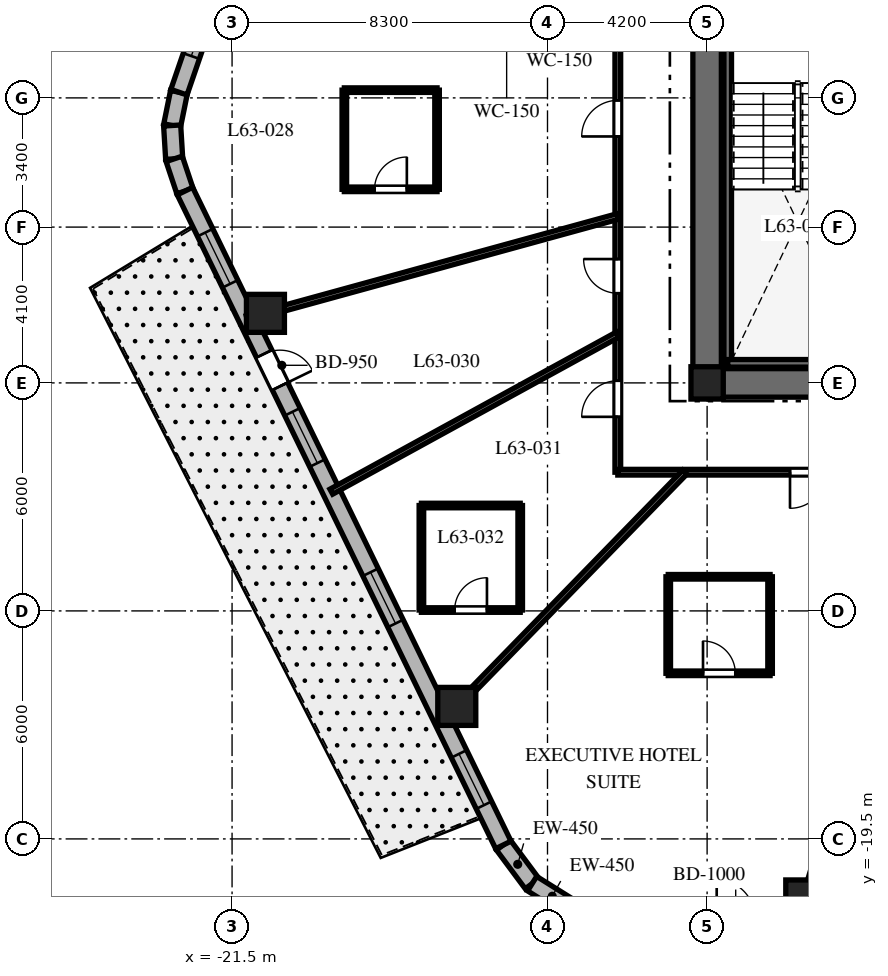
"""IFC4 building model, lengths in metres.
Left out: names, types, materials, properties, quantities, classifications, styles, units other than length and angle.
Written with IfcOpenShell. Run it as: python <this file> out.ifc"""

import sys

from ifc_helpers import new_model, si_unit, direction, frame, frame_2d, origin, origin_2d, place, context, subcontext, project, spatial, rectangle, extrude, element, fill, save


model = new_model("IFC4")
c1 = context("Model", 3, precision=1e-05, world=origin(), true_north=direction((0.0, 1.0)))
c2 = subcontext(c1, "Body", "Model", "MODEL_VIEW")
j1 = project(units=[si_unit("LENGTHUNIT", "METRE"), si_unit("PLANEANGLEUNIT", "RADIAN")], contexts=[c1])
p1 = place(None, origin())
s1 = spatial("IfcSite", under=j1, at=p1, CompositionType="ELEMENT")
p2 = place(p1, origin())
s2 = spatial("IfcBuilding", under=s1, at=p2, CompositionType="ELEMENT")
p3 = place(p2, frame((0.0, 0.0, 252.1)))
s3 = spatial("IfcBuildingStorey", under=s2, at=p3, CompositionType="ELEMENT", Elevation=252.1)
p4 = place(p3, frame((-9.375, -7.5, 0.0), z_axis=(0.0, 0.0, 1.0), x_axis=(1.0, 0.0, 0.0)))
e1 = element("IfcWall", 1, at=p4, inside=s3, PredefinedType="SHEAR", context=c2, shape_type="SweptSolid", body=[
    extrude(rectangle(XDim=18.75, YDim=0.75, at=frame_2d((9.375, 0.0))), origin(), (0.0, 0.0, 1.0), 3.8),
])
p5 = place(p4, frame((9.425, 0.0, 0.0)))
e2 = element("IfcOpeningElement", 2, at=p5, cuts=e1, PredefinedType="OPENING", context=c2, shape_type="SweptSolid", body=[
    extrude(rectangle(XDim=1.0, YDim=2.15, at=frame_2d((0.5, 1.075))), frame((0.0, 0.385, 0.0), z_axis=(0.0, -1.0, 0.0), x_axis=(1.0, 0.0, 0.0)), (0.0, 0.0, 1.0), 0.77),
])
p6 = place(p3, frame((-9.0, -7.125, 0.0), z_axis=(0.0, 0.0, 1.0), x_axis=(0.0, 1.0, 0.0)))
e3 = element("IfcWall", 3, at=p6, inside=s3, PredefinedType="SHEAR", context=c2, shape_type="SweptSolid", body=[
    extrude(rectangle(XDim=14.25, YDim=0.75, at=frame_2d((7.125, 0.0))), origin(), (0.0, 0.0, 1.0), 3.8),
])
p7 = place(p6, frame((10.25, 0.0, 0.0)))
e4 = element("IfcOpeningElement", 4, at=p7, cuts=e3, PredefinedType="OPENING", context=c2, shape_type="SweptSolid", body=[
    extrude(rectangle(XDim=1.05, YDim=2.15, at=frame_2d((0.525, 1.075))), frame((0.0, 0.385, 0.0), z_axis=(0.0, -1.0, 0.0), x_axis=(1.0, 0.0, 0.0)), (0.0, 0.0, 1.0), 0.77),
])
p8 = place(p3, frame((-8.458, -6.985, 0.0), z_axis=(0.0, 0.0, 1.0), x_axis=(0.0, 1.0, 0.0)))
e5 = element("IfcWall", 5, at=p8, inside=s3, PredefinedType="SHEAR", context=c2, shape_type="SweptSolid", body=[
    extrude(rectangle(XDim=9.143, YDim=0.2, at=frame_2d((4.572, 0.0))), origin(), (0.0, 0.0, 1.0), 3.8),
])
p9 = place(p3, frame((-8.458, -6.985, 0.0), z_axis=(0.0, 0.0, 1.0), x_axis=(1.0, 0.0, 0.0)))
e6 = element("IfcWall", 6, at=p9, inside=s3, PredefinedType="SHEAR", context=c2, shape_type="SweptSolid", body=[
    extrude(rectangle(XDim=3.686, YDim=0.2, at=frame_2d((1.843, 0.0))), origin(), (0.0, 0.0, 1.0), 3.8),
])
p10 = place(p3, frame((-9.0, -7.5, 0.0), z_axis=(0.0, 0.0, 1.0), x_axis=(1.0, 0.0, 0.0)))
e7 = element("IfcColumn", 7, at=p10, inside=s3, PredefinedType="COLUMN", context=c2, shape_type="SweptSolid", body=[
    extrude(rectangle(XDim=0.85, YDim=0.85, at=origin_2d()), origin(), (0.0, 0.0, 1.0), 3.8),
])
for number, where, z_axis, x_axis in (
    (8, (-6.43, -21.08, 0.0), (0.0, 0.0, 1.0), (1.0, 0.0, 0.0)),
    (9, (-20.622, -5.67, 0.0), (0.0, 0.0, 1.0), (1.0, 0.0, 0.0)),
    (10, (-15.587, -16.013, 0.0), (0.0, 0.0, 1.0), (1.0, 0.0, 0.0)),
):
    element("IfcColumn", number, at=place(p3, frame(where, z_axis=z_axis, x_axis=x_axis)), inside=s3, PredefinedType="COLUMN", context=c2, shape_type="SweptSolid", body=[
        extrude(rectangle(XDim=1.0, YDim=1.0, at=origin_2d()), origin(), (0.0, 0.0, 1.0), 3.8),
    ])
p11 = place(p3, frame((-14.362, -19.658, 0.0), z_axis=(0.0, 0.0, 1.0), x_axis=(0.596642462792, -0.80250717853, 0.0)))
e11 = element("IfcWall", 11, at=p11, inside=s3, PredefinedType="SOLIDWALL", context=c2, shape_type="SweptSolid", body=[
    extrude(rectangle(XDim=1.27, YDim=0.45, at=frame_2d((0.635, 0.0))), origin(), (0.0, 0.0, 1.0), 3.48),
])
p12 = place(p3, frame((-13.604, -20.678, 0.0), z_axis=(0.0, 0.0, 1.0), x_axis=(0.847910404124, -0.53013955387, 0.0)))
e12 = element("IfcWall", 12, at=p12, inside=s3, PredefinedType="SOLIDWALL", context=c2, shape_type="SweptSolid", body=[
    extrude(rectangle(XDim=1.249, YDim=0.45, at=frame_2d((0.624, 0.0))), origin(), (0.0, 0.0, 1.0), 3.48),
])
p13 = place(p3, frame((-22.898, 0.15, 0.0), z_axis=(0.0, 0.0, 1.0), x_axis=(-0.199055826889, -0.979988151858, 0.0)))
e13 = element("IfcWall", 13, at=p13, inside=s3, PredefinedType="SOLIDWALL", context=c2, shape_type="SweptSolid", body=[
    extrude(rectangle(XDim=0.894, YDim=0.45, at=frame_2d((0.447, 0.0))), origin(), (0.0, 0.0, 1.0), 3.48),
])
p14 = place(p3, frame((-23.076, -0.727, 0.0), z_axis=(0.0, 0.0, 1.0), x_axis=(0.060805222108, -0.998149650586, 0.0)))
e14 = element("IfcWall", 14, at=p14, inside=s3, PredefinedType="SOLIDWALL", context=c2, shape_type="SweptSolid", body=[
    extrude(rectangle(XDim=0.879, YDim=0.45, at=frame_2d((0.44, 0.0))), origin(), (0.0, 0.0, 1.0), 3.48),
])
p15 = place(p3, frame((-23.023, -1.604, 0.0), z_axis=(0.0, 0.0, 1.0), x_axis=(0.316801227695, -0.948491951537, 0.0)))
e15 = element("IfcWall", 15, at=p15, inside=s3, PredefinedType="SOLIDWALL", context=c2, shape_type="SweptSolid", body=[
    extrude(rectangle(XDim=0.894, YDim=0.45, at=frame_2d((0.447, 0.0))), origin(), (0.0, 0.0, 1.0), 3.48),
])
p16 = place(p3, frame((-16.324, 19.275, 0.0), z_axis=(0.0, 0.0, 1.0), x_axis=(-0.325083142304, -0.945685439557, 0.0)))
e16 = element("IfcWall", 16, at=p16, inside=s3, PredefinedType="SOLIDWALL", context=c2, shape_type="SweptSolid", body=[
    extrude(rectangle(XDim=20.224, YDim=0.45, at=frame_2d((10.112, 0.0))), origin(), (0.0, 0.0, 1.0), 3.48),
])
p17 = place(p16, frame((0.953, 0.0, 0.8)))
e17 = element("IfcOpeningElement", 17, at=p17, cuts=e16, PredefinedType="OPENING", context=c2, shape_type="SweptSolid", body=[
    extrude(rectangle(XDim=2.1, YDim=1.85, at=frame_2d((1.05, 0.925))), frame((0.0, 0.235, 0.0), z_axis=(0.0, -1.0, 0.0), x_axis=(1.0, 0.0, 0.0)), (0.0, 0.0, 1.0), 0.47),
])
p18 = place(p16, frame((6.268, 0.0, 0.8)))
e18 = element("IfcOpeningElement", 18, at=p18, cuts=e16, PredefinedType="OPENING", context=c2, shape_type="SweptSolid", body=[
    extrude(rectangle(XDim=2.1, YDim=1.85, at=frame_2d((1.05, 0.925))), frame((0.0, 0.235, 0.0), z_axis=(0.0, -1.0, 0.0), x_axis=(1.0, 0.0, 0.0)), (0.0, 0.0, 1.0), 0.47),
])
p19 = place(p16, frame((11.95, 0.0, 0.8)))
e19 = element("IfcOpeningElement", 19, at=p19, cuts=e16, PredefinedType="OPENING", context=c2, shape_type="SweptSolid", body=[
    extrude(rectangle(XDim=2.1, YDim=1.85, at=frame_2d((1.05, 0.925))), frame((0.0, 0.235, 0.0), z_axis=(0.0, -1.0, 0.0), x_axis=(1.0, 0.0, 0.0)), (0.0, 0.0, 1.0), 0.47),
])
p20 = place(p16, frame((17.118, 0.0, 0.8)))
e20 = element("IfcOpeningElement", 20, at=p20, cuts=e16, PredefinedType="OPENING", context=c2, shape_type="SweptSolid", body=[
    extrude(rectangle(XDim=2.1, YDim=1.85, at=frame_2d((1.05, 0.925))), frame((0.0, 0.235, 0.0), z_axis=(0.0, -1.0, 0.0), x_axis=(1.0, 0.0, 0.0)), (0.0, 0.0, 1.0), 0.47),
])
p21 = place(p3, frame((-22.74, -2.452, 0.0), z_axis=(0.0, 0.0, 1.0), x_axis=(0.437753424814, -0.899095066755, 0.0)))
e21 = element("IfcWall", 21, at=p21, inside=s3, PredefinedType="SOLIDWALL", context=c2, shape_type="SweptSolid", body=[
    extrude(rectangle(XDim=19.137, YDim=0.45, at=frame_2d((9.569, 0.0))), origin(), (0.0, 0.0, 1.0), 3.48),
])
p22 = place(p21, frame((4.763, 0.0, 0.0)))
e22 = element("IfcOpeningElement", 22, at=p22, cuts=e21, PredefinedType="OPENING", context=c2, shape_type="SweptSolid", body=[
    extrude(rectangle(XDim=0.95, YDim=2.15, at=frame_2d((0.475, 1.075))), frame((0.0, 0.235, 0.0), z_axis=(0.0, -1.0, 0.0), x_axis=(1.0, 0.0, 0.0)), (0.0, 0.0, 1.0), 0.47),
])
p23 = place(p21, frame((1.216, 0.0, 0.8)))
e23 = element("IfcOpeningElement", 23, at=p23, cuts=e21, PredefinedType="OPENING", context=c2, shape_type="SweptSolid", body=[
    extrude(rectangle(XDim=1.5, YDim=1.8, at=frame_2d((0.75, 0.9))), frame((0.0, 0.235, 0.0), z_axis=(0.0, -1.0, 0.0), x_axis=(1.0, 0.0, 0.0)), (0.0, 0.0, 1.0), 0.47),
])
p24 = place(p21, frame((6.461, 0.0, 0.8)))
e24 = element("IfcOpeningElement", 24, at=p24, cuts=e21, PredefinedType="OPENING", context=c2, shape_type="SweptSolid", body=[
    extrude(rectangle(XDim=1.5, YDim=1.8, at=frame_2d((0.75, 0.9))), frame((0.0, 0.235, 0.0), z_axis=(0.0, -1.0, 0.0), x_axis=(1.0, 0.0, 0.0)), (0.0, 0.0, 1.0), 0.47),
])
p25 = place(p21, frame((11.156, 0.0, 0.8)))
e25 = element("IfcOpeningElement", 25, at=p25, cuts=e21, PredefinedType="OPENING", context=c2, shape_type="SweptSolid", body=[
    extrude(rectangle(XDim=1.5, YDim=1.8, at=frame_2d((0.75, 0.9))), frame((0.0, 0.235, 0.0), z_axis=(0.0, -1.0, 0.0), x_axis=(1.0, 0.0, 0.0)), (0.0, 0.0, 1.0), 0.47),
])
p26 = place(p21, frame((16.473, 0.0, 0.8)))
e26 = element("IfcOpeningElement", 26, at=p26, cuts=e21, PredefinedType="OPENING", context=c2, shape_type="SweptSolid", body=[
    extrude(rectangle(XDim=1.5, YDim=1.8, at=frame_2d((0.75, 0.9))), frame((0.0, 0.235, 0.0), z_axis=(0.0, -1.0, 0.0), x_axis=(1.0, 0.0, 0.0)), (0.0, 0.0, 1.0), 0.47),
])
p27 = place(p3, frame((-11.35, -9.85, 0.0), z_axis=(0.0, 0.0, 1.0), x_axis=(0.0, 1.0, 0.0)))
e27 = element("IfcWall", 27, at=p27, inside=s3, PredefinedType="PARTITIONING", context=c2, shape_type="SweptSolid", body=[
    extrude(rectangle(XDim=12.4, YDim=0.15, at=frame_2d((6.2, 0.0))), origin(), (0.0, 0.0, 1.0), 2.97),
])
p28 = place(p27, frame((8.835, 0.0, 0.0)))
e28 = element("IfcOpeningElement", 28, at=p28, cuts=e27, PredefinedType="OPENING", context=c2, shape_type="SweptSolid", body=[
    extrude(rectangle(XDim=0.95, YDim=2.03, at=frame_2d((0.475, 1.015))), frame((0.0, 0.085, 0.0), z_axis=(0.0, -1.0, 0.0), x_axis=(1.0, 0.0, 0.0)), (0.0, 0.0, 1.0), 0.17),
])
p29 = place(p27, frame((4.709, 0.0, 0.0)))
e29 = element("IfcOpeningElement", 29, at=p29, cuts=e27, PredefinedType="OPENING", context=c2, shape_type="SweptSolid", body=[
    extrude(rectangle(XDim=0.9, YDim=2.03, at=frame_2d((0.45, 1.015))), frame((0.0, 0.085, 0.0), z_axis=(0.0, -1.0, 0.0), x_axis=(1.0, 0.0, 0.0)), (0.0, 0.0, 1.0), 0.17),
])
p30 = place(p27, frame((1.457, 0.0, 0.0)))
e30 = element("IfcOpeningElement", 30, at=p30, cuts=e27, PredefinedType="OPENING", context=c2, shape_type="SweptSolid", body=[
    extrude(rectangle(XDim=0.95, YDim=2.03, at=frame_2d((0.475, 1.015))), frame((0.0, 0.085, 0.0), z_axis=(0.0, -1.0, 0.0), x_axis=(1.0, 0.0, 0.0)), (0.0, 0.0, 1.0), 0.17),
])
p31 = place(p3, frame((-0.92, -9.85, 0.0), z_axis=(0.0, 0.0, 1.0), x_axis=(-1.0, 0.0, 0.0)))
e31 = element("IfcWall", 31, at=p31, inside=s3, PredefinedType="PARTITIONING", context=c2, shape_type="SweptSolid", body=[
    extrude(rectangle(XDim=10.43, YDim=0.15, at=frame_2d((5.215, 0.0))), origin(), (0.0, 0.0, 1.0), 2.97),
])
p32 = place(p31, frame((4.949, 0.0, 0.0)))
e32 = element("IfcOpeningElement", 32, at=p32, cuts=e31, PredefinedType="OPENING", context=c2, shape_type="SweptSolid", body=[
    extrude(rectangle(XDim=0.95, YDim=2.03, at=frame_2d((0.475, 1.015))), frame((0.0, 0.085, 0.0), z_axis=(0.0, -1.0, 0.0), x_axis=(1.0, 0.0, 0.0)), (0.0, 0.0, 1.0), 0.17),
])
p33 = place(p3, frame((-11.35, -3.121, 0.0), z_axis=(0.0, 0.0, 1.0), x_axis=(-0.964212793822, -0.265129568758, 0.0)))
e33 = element("IfcWall", 33, at=p33, inside=s3, PredefinedType="PARTITIONING", context=c2, shape_type="SweptSolid", body=[
    extrude(rectangle(XDim=10.12, YDim=0.15, at=frame_2d((5.06, 0.0))), origin(), (0.0, 0.0, 1.0), 2.72),
])
p34 = place(p3, frame((-11.35, -6.227, 0.0), z_axis=(0.0, 0.0, 1.0), x_axis=(-0.876723190824, -0.480995266786, 0.0)))
e34 = element("IfcWall", 34, at=p34, inside=s3, PredefinedType="PARTITIONING", context=c2, shape_type="SweptSolid", body=[
    extrude(rectangle(XDim=8.598, YDim=0.15, at=frame_2d((4.299, 0.0))), origin(), (0.0, 0.0, 1.0), 2.72),
])
p35 = place(p3, frame((-9.588, -9.85, 0.0), z_axis=(0.0, 0.0, 1.0), x_axis=(-0.697519469595, -0.716565830567, 0.0)))
e35 = element("IfcWall", 35, at=p35, inside=s3, PredefinedType="PARTITIONING", context=c2, shape_type="SweptSolid", body=[
    extrude(rectangle(XDim=9.126, YDim=0.15, at=frame_2d((4.563, 0.0))), origin(), (0.0, 0.0, 1.0), 2.72),
])
p36 = place(p3, frame((-3.004, -9.85, 0.0), z_axis=(0.0, 0.0, 1.0), x_axis=(-0.291775760688, -0.956486751333, 0.0)))
e36 = element("IfcWall", 36, at=p36, inside=s3, PredefinedType="PARTITIONING", context=c2, shape_type="SweptSolid", body=[
    extrude(rectangle(XDim=12.258, YDim=0.15, at=frame_2d((6.129, 0.0))), origin(), (0.0, 0.0, 1.0), 2.72),
])
p37 = place(p3, frame((-18.546, -2.406, 0.0), z_axis=(0.0, 0.0, 1.0), x_axis=(1.0, 0.0, 0.0)))
e37 = element("IfcWall", 37, at=p37, inside=s3, PredefinedType="PARTITIONING", context=c2, shape_type="SweptSolid", body=[
    extrude(rectangle(XDim=2.44, YDim=0.12, at=frame_2d((1.22, 0.0))), origin(), (0.0, 0.0, 1.0), 2.92),
])
p38 = place(p37, frame((0.795, 0.0, 0.0)))
e38 = element("IfcOpeningElement", 38, at=p38, cuts=e37, PredefinedType="OPENING", context=c2, shape_type="SweptSolid", body=[
    extrude(rectangle(XDim=0.85, YDim=2.03, at=frame_2d((0.425, 1.015))), frame((0.0, 0.07, 0.0), z_axis=(0.0, -1.0, 0.0), x_axis=(1.0, 0.0, 0.0)), (0.0, 0.0, 1.0), 0.14),
])
p39 = place(p3, frame((-16.106, -2.406, 0.0), z_axis=(0.0, 0.0, 1.0), x_axis=(0.0, 1.0, 0.0)))
e39 = element("IfcWall", 39, at=p39, inside=s3, PredefinedType="PARTITIONING", context=c2, shape_type="SweptSolid", body=[
    extrude(rectangle(XDim=2.61, YDim=0.12, at=frame_2d((1.305, 0.0))), origin(), (0.0, 0.0, 1.0), 3.48),
])
p40 = place(p3, frame((-16.106, 0.204, 0.0), z_axis=(0.0, 0.0, 1.0), x_axis=(-1.0, 0.0, 0.0)))
e40 = element("IfcWall", 40, at=p40, inside=s3, PredefinedType="PARTITIONING", context=c2, shape_type="SweptSolid", body=[
    extrude(rectangle(XDim=2.44, YDim=0.12, at=frame_2d((1.22, 0.0))), origin(), (0.0, 0.0, 1.0), 2.92),
])
p41 = place(p3, frame((-18.546, 0.204, 0.0), z_axis=(0.0, 0.0, 1.0), x_axis=(0.0, -1.0, 0.0)))
e41 = element("IfcWall", 41, at=p41, inside=s3, PredefinedType="PARTITIONING", context=c2, shape_type="SweptSolid", body=[
    extrude(rectangle(XDim=2.61, YDim=0.12, at=frame_2d((1.305, 0.0))), origin(), (0.0, 0.0, 1.0), 3.48),
])
p42 = place(p3, frame((-16.518, -13.477, 0.0), z_axis=(0.0, 0.0, 1.0), x_axis=(1.0, 0.0, 0.0)))
e42 = element("IfcWall", 42, at=p42, inside=s3, PredefinedType="PARTITIONING", context=c2, shape_type="SweptSolid", body=[
    extrude(rectangle(XDim=2.6, YDim=0.12, at=frame_2d((1.3, 0.0))), origin(), (0.0, 0.0, 1.0), 3.48),
])
p43 = place(p42, frame((0.875, 0.0, 0.0)))
e43 = element("IfcOpeningElement", 43, at=p43, cuts=e42, PredefinedType="OPENING", context=c2, shape_type="SweptSolid", body=[
    extrude(rectangle(XDim=0.85, YDim=2.03, at=frame_2d((0.425, 1.015))), frame((0.0, 0.07, 0.0), z_axis=(0.0, -1.0, 0.0), x_axis=(1.0, 0.0, 0.0)), (0.0, 0.0, 1.0), 0.14),
])
p44 = place(p3, frame((-13.918, -13.477, 0.0), z_axis=(0.0, 0.0, 1.0), x_axis=(0.0, 1.0, 0.0)))
e44 = element("IfcWall", 44, at=p44, inside=s3, PredefinedType="PARTITIONING", context=c2, shape_type="SweptSolid", body=[
    extrude(rectangle(XDim=2.75, YDim=0.12, at=frame_2d((1.375, 0.0))), origin(), (0.0, 0.0, 1.0), 3.006),
])
p45 = place(p3, frame((-13.918, -10.727, 0.0), z_axis=(0.0, 0.0, 1.0), x_axis=(-1.0, 0.0, 0.0)))
e45 = element("IfcWall", 45, at=p45, inside=s3, PredefinedType="PARTITIONING", context=c2, shape_type="SweptSolid", body=[
    extrude(rectangle(XDim=2.6, YDim=0.12, at=frame_2d((1.3, 0.0))), origin(), (0.0, 0.0, 1.0), 3.006),
])
p46 = place(p3, frame((-16.518, -10.727, 0.0), z_axis=(0.0, 0.0, 1.0), x_axis=(0.0, -1.0, 0.0)))
e46 = element("IfcWall", 46, at=p46, inside=s3, PredefinedType="PARTITIONING", context=c2, shape_type="SweptSolid", body=[
    extrude(rectangle(XDim=2.75, YDim=0.12, at=frame_2d((1.375, 0.0))), origin(), (0.0, 0.0, 1.0), 3.48),
])
p47 = place(p3, frame((-10.023, -15.142, 0.0), z_axis=(0.0, 0.0, 1.0), x_axis=(1.0, 0.0, 0.0)))
e47 = element("IfcWall", 47, at=p47, inside=s3, PredefinedType="PARTITIONING", context=c2, shape_type="SweptSolid", body=[
    extrude(rectangle(XDim=2.68, YDim=0.12, at=frame_2d((1.34, 0.0))), origin(), (0.0, 0.0, 1.0), 3.052),
])
p48 = place(p47, frame((0.915, 0.0, 0.0)))
e48 = element("IfcOpeningElement", 48, at=p48, cuts=e47, PredefinedType="OPENING", context=c2, shape_type="SweptSolid", body=[
    extrude(rectangle(XDim=0.85, YDim=2.03, at=frame_2d((0.425, 1.015))), frame((0.0, 0.07, 0.0), z_axis=(0.0, -1.0, 0.0), x_axis=(1.0, 0.0, 0.0)), (0.0, 0.0, 1.0), 0.14),
])
p49 = place(p3, frame((-7.343, -15.142, 0.0), z_axis=(0.0, 0.0, 1.0), x_axis=(0.0, 1.0, 0.0)))
e49 = element("IfcWall", 49, at=p49, inside=s3, PredefinedType="PARTITIONING", context=c2, shape_type="SweptSolid", body=[
    extrude(rectangle(XDim=2.54, YDim=0.12, at=frame_2d((1.27, 0.0))), origin(), (0.0, 0.0, 1.0), 2.92),
])
p50 = place(p3, frame((-7.343, -12.602, 0.0), z_axis=(0.0, 0.0, 1.0), x_axis=(-1.0, 0.0, 0.0)))
e50 = element("IfcWall", 50, at=p50, inside=s3, PredefinedType="PARTITIONING", context=c2, shape_type="SweptSolid", body=[
    extrude(rectangle(XDim=2.68, YDim=0.12, at=frame_2d((1.34, 0.0))), origin(), (0.0, 0.0, 1.0), 2.92),
])
p51 = place(p3, frame((-10.023, -12.602, 0.0), z_axis=(0.0, 0.0, 1.0), x_axis=(0.0, -1.0, 0.0)))
e51 = element("IfcWall", 51, at=p51, inside=s3, PredefinedType="PARTITIONING", context=c2, shape_type="SweptSolid", body=[
    extrude(rectangle(XDim=2.54, YDim=0.12, at=frame_2d((1.27, 0.0))), origin(), (0.0, 0.0, 1.0), 3.052),
])
p52 = place(p20, origin())
e52 = element("IfcWindow", 52, at=p52, inside=s3, PartitioningType="SINGLE_PANEL", PredefinedType="WINDOW", context=c2, shape_type="SweptSolid", body=[
    extrude(rectangle(XDim=2.1, YDim=1.85, at=frame_2d((1.05, 0.925))), frame((0.0, 0.03, 0.0), z_axis=(0.0, -1.0, 0.0), x_axis=(1.0, 0.0, 0.0)), (0.0, 0.0, 1.0), 0.06),
])
fill(e20, e52)
p53 = place(p22, origin())
e53 = element("IfcDoor", 53, at=p53, inside=s3, OperationType="SINGLE_SWING_RIGHT", PredefinedType="DOOR", context=c2, shape_type="SweptSolid", body=[
    extrude(rectangle(XDim=0.95, YDim=2.15, at=frame_2d((0.475, 1.075))), frame((0.0, 0.025, 0.0), z_axis=(0.0, -1.0, 0.0), x_axis=(1.0, 0.0, 0.0)), (0.0, 0.0, 1.0), 0.05),
])
fill(e22, e53)
p54 = place(p23, origin())
e54 = element("IfcWindow", 54, at=p54, inside=s3, PartitioningType="SINGLE_PANEL", PredefinedType="WINDOW", context=c2, shape_type="SweptSolid", body=[
    extrude(rectangle(XDim=1.5, YDim=1.8, at=frame_2d((0.75, 0.9))), frame((0.0, 0.03, 0.0), z_axis=(0.0, -1.0, 0.0), x_axis=(1.0, 0.0, 0.0)), (0.0, 0.0, 1.0), 0.06),
])
fill(e23, e54)
p55 = place(p24, origin())
e55 = element("IfcWindow", 55, at=p55, inside=s3, PartitioningType="SINGLE_PANEL", PredefinedType="WINDOW", context=c2, shape_type="SweptSolid", body=[
    extrude(rectangle(XDim=1.5, YDim=1.8, at=frame_2d((0.75, 0.9))), frame((0.0, 0.03, 0.0), z_axis=(0.0, -1.0, 0.0), x_axis=(1.0, 0.0, 0.0)), (0.0, 0.0, 1.0), 0.06),
])
fill(e24, e55)
p56 = place(p25, origin())
e56 = element("IfcWindow", 56, at=p56, inside=s3, PartitioningType="SINGLE_PANEL", PredefinedType="WINDOW", context=c2, shape_type="SweptSolid", body=[
    extrude(rectangle(XDim=1.5, YDim=1.8, at=frame_2d((0.75, 0.9))), frame((0.0, 0.03, 0.0), z_axis=(0.0, -1.0, 0.0), x_axis=(1.0, 0.0, 0.0)), (0.0, 0.0, 1.0), 0.06),
])
fill(e25, e56)
p57 = place(p26, origin())
e57 = element("IfcWindow", 57, at=p57, inside=s3, PartitioningType="SINGLE_PANEL", PredefinedType="WINDOW", context=c2, shape_type="SweptSolid", body=[
    extrude(rectangle(XDim=1.5, YDim=1.8, at=frame_2d((0.75, 0.9))), frame((0.0, 0.03, 0.0), z_axis=(0.0, -1.0, 0.0), x_axis=(1.0, 0.0, 0.0)), (0.0, 0.0, 1.0), 0.06),
])
fill(e26, e57)
p58 = place(p28, origin())
e58 = element("IfcDoor", 58, at=p58, inside=s3, OperationType="SINGLE_SWING_LEFT", PredefinedType="DOOR", context=c2, shape_type="SweptSolid", body=[
    extrude(rectangle(XDim=0.95, YDim=2.03, at=frame_2d((0.475, 1.015))), frame((0.0, 0.025, 0.0), z_axis=(0.0, -1.0, 0.0), x_axis=(1.0, 0.0, 0.0)), (0.0, 0.0, 1.0), 0.05),
])
fill(e28, e58)
p59 = place(p38, origin())
e59 = element("IfcDoor", 59, at=p59, inside=s3, OperationType="SINGLE_SWING_RIGHT", PredefinedType="DOOR", context=c2, shape_type="SweptSolid", body=[
    extrude(rectangle(XDim=0.85, YDim=2.03, at=frame_2d((0.425, 1.015))), frame((0.0, 0.025, 0.0), z_axis=(0.0, -1.0, 0.0), x_axis=(1.0, 0.0, 0.0)), (0.0, 0.0, 1.0), 0.05),
])
fill(e38, e59)
p60 = place(p29, origin())
e60 = element("IfcDoor", 60, at=p60, inside=s3, OperationType="SINGLE_SWING_RIGHT", PredefinedType="DOOR", context=c2, shape_type="SweptSolid", body=[
    extrude(rectangle(XDim=0.9, YDim=2.03, at=frame_2d((0.45, 1.015))), frame((0.0, 0.025, 0.0), z_axis=(0.0, -1.0, 0.0), x_axis=(1.0, 0.0, 0.0)), (0.0, 0.0, 1.0), 0.05),
])
fill(e29, e60)
p61 = place(p30, origin())
e61 = element("IfcDoor", 61, at=p61, inside=s3, OperationType="SINGLE_SWING_LEFT", PredefinedType="DOOR", context=c2, shape_type="SweptSolid", body=[
    extrude(rectangle(XDim=0.95, YDim=2.03, at=frame_2d((0.475, 1.015))), frame((0.0, 0.025, 0.0), z_axis=(0.0, -1.0, 0.0), x_axis=(1.0, 0.0, 0.0)), (0.0, 0.0, 1.0), 0.05),
])
fill(e30, e61)
p62 = place(p43, origin())
e62 = element("IfcDoor", 62, at=p62, inside=s3, OperationType="SINGLE_SWING_RIGHT", PredefinedType="DOOR", context=c2, shape_type="SweptSolid", body=[
    extrude(rectangle(XDim=0.85, YDim=2.03, at=frame_2d((0.425, 1.015))), frame((0.0, 0.025, 0.0), z_axis=(0.0, -1.0, 0.0), x_axis=(1.0, 0.0, 0.0)), (0.0, 0.0, 1.0), 0.05),
])
fill(e43, e62)
p63 = place(p32, origin())
e63 = element("IfcDoor", 63, at=p63, inside=s3, OperationType="SINGLE_SWING_RIGHT", PredefinedType="DOOR", context=c2, shape_type="SweptSolid", body=[
    extrude(rectangle(XDim=0.95, YDim=2.03, at=frame_2d((0.475, 1.015))), frame((0.0, 0.025, 0.0), z_axis=(0.0, -1.0, 0.0), x_axis=(1.0, 0.0, 0.0)), (0.0, 0.0, 1.0), 0.05),
])
fill(e32, e63)
p64 = place(p48, origin())
e64 = element("IfcDoor", 64, at=p64, inside=s3, OperationType="SINGLE_SWING_LEFT", PredefinedType="DOOR", context=c2, shape_type="SweptSolid", body=[
    extrude(rectangle(XDim=0.85, YDim=2.03, at=frame_2d((0.425, 1.015))), frame((0.0, 0.025, 0.0), z_axis=(0.0, -1.0, 0.0), x_axis=(1.0, 0.0, 0.0)), (0.0, 0.0, 1.0), 0.05),
])
fill(e48, e64)
save(model, sys.argv[1])
